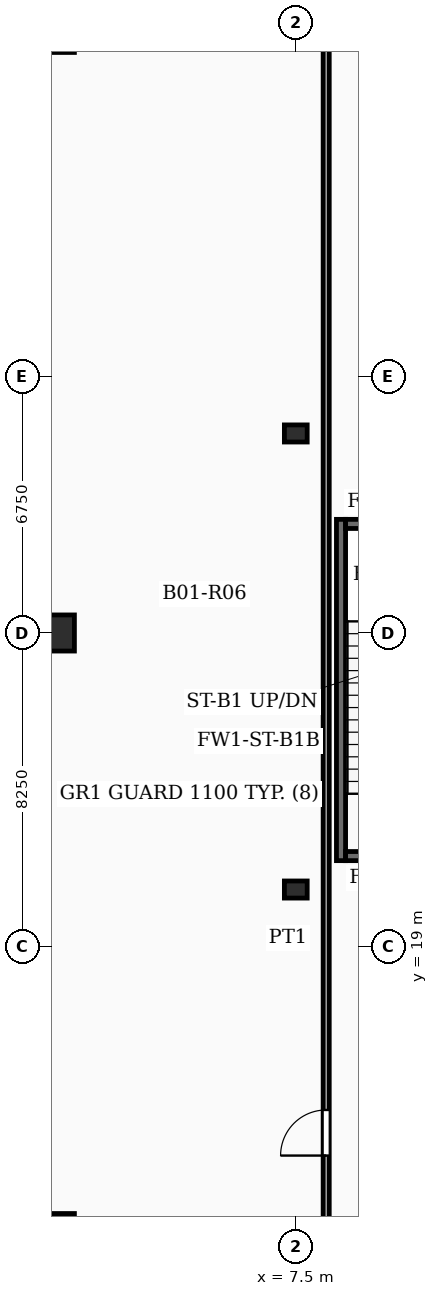
"""IFC4 building model, lengths in metres.
Left out: names, types, materials, properties, quantities, classifications, styles, units other than length and angle.
Written with IfcOpenShell. Run it as: python <this file> out.ifc"""

import sys

from ifc_helpers import new_model, si_unit, direction, frame, frame_2d, origin, origin_2d, place, context, subcontext, project, spatial, rectangle, extrude, element, fill, save


model = new_model("IFC4")
c1 = context("Model", 3, precision=1e-05, world=origin(), true_north=direction((0.0, 1.0)))
c2 = subcontext(c1, "Body", "Model", "MODEL_VIEW")
j1 = project(units=[si_unit("LENGTHUNIT", "METRE"), si_unit("PLANEANGLEUNIT", "RADIAN")], contexts=[c1])
p1 = place(None, origin())
s1 = spatial("IfcSite", under=j1, at=p1, CompositionType="ELEMENT")
p2 = place(p1, origin())
s2 = spatial("IfcBuilding", under=s1, at=p2, CompositionType="ELEMENT")
p3 = place(p2, frame((0.0, 0.0, -5.0)))
s3 = spatial("IfcBuildingStorey", under=s2, at=p3, CompositionType="ELEMENT", Elevation=-5.0)
for number, where, z_axis, x_axis in (
    (1, (1.2, 27.25, -0.31), (0.0, 0.0, 1.0), (1.0, 0.0, 0.0)),
    (2, (1.2, 11.5, -0.31), (0.0, 0.0, 1.0), (1.0, 0.0, 0.0)),
):
    element("IfcColumn", number, at=place(p3, frame(where, z_axis=z_axis, x_axis=x_axis)), inside=s3, PredefinedType="COLUMN", context=c2, shape_type="SweptSolid", body=[
        extrude(rectangle(XDim=0.95, YDim=0.95, at=origin_2d()), origin(), (0.0, 0.0, 1.0), 4.86),
    ])
for number, where, z_axis, x_axis in (
    (3, (7.5, 20.5, -0.31), (0.0, 0.0, 1.0), (1.0, 0.0, 0.0)),
    (4, (7.5, 32.5, -0.31), (0.0, 0.0, 1.0), (1.0, 0.0, 0.0)),
):
    element("IfcColumn", number, at=place(p3, frame(where, z_axis=z_axis, x_axis=x_axis)), inside=s3, PredefinedType="PILASTER", context=c2, shape_type="SweptSolid", body=[
        extrude(rectangle(XDim=0.6, YDim=0.45, at=origin_2d()), origin(), (0.0, 0.0, 1.0), 4.86),
    ])
p4 = place(p3, frame((8.69, 21.26, 0.0), z_axis=(0.0, 0.0, 1.0), x_axis=(0.0, 1.0, 0.0)))
e5 = element("IfcWall", 5, at=p4, inside=s3, PredefinedType="SOLIDWALL", context=c2, shape_type="SweptSolid", body=[
    extrude(rectangle(XDim=8.98, YDim=0.24, at=frame_2d((4.49, 0.0))), origin(), (0.0, 0.0, 1.0), 4.55),
])
for number, where, z_axis, x_axis in (
    (6, (8.81, 21.38, 0.0), (0.0, 0.0, 1.0), (1.0, 0.0, 0.0)),
    (7, (8.81, 30.12, 0.0), (0.0, 0.0, 1.0), (1.0, 0.0, 0.0)),
):
    element("IfcWall", number, at=place(p3, frame(where, z_axis=z_axis, x_axis=x_axis)), inside=s3, PredefinedType="SOLIDWALL", context=c2, shape_type="SweptSolid", body=[
        extrude(rectangle(XDim=3.19, YDim=0.24, at=frame_2d((1.595, 0.0))), origin(), (0.0, 0.0, 1.0), 4.55),
    ])
p5 = place(p3, frame((8.3, 0.5, 0.0), z_axis=(0.0, 0.0, 1.0), x_axis=(0.0, 1.0, 0.0)))
e8 = element("IfcWall", 8, at=p5, inside=s3, PredefinedType="PARTITIONING", context=c2, shape_type="SweptSolid", body=[
    extrude(rectangle(XDim=53.5, YDim=0.16, at=frame_2d((26.75, 0.0))), origin(), (0.0, 0.0, 1.0), 3.61),
])
p6 = place(p5, frame((13.0, 0.0, 0.0)))
e9 = element("IfcOpeningElement", 9, at=p6, cuts=e8, PredefinedType="OPENING", context=c2, shape_type="SweptSolid", body=[
    extrude(rectangle(XDim=1.2, YDim=2.2, at=frame_2d((0.6, 1.1))), frame((0.0, 0.09, 0.0), z_axis=(0.0, -1.0, 0.0), x_axis=(1.0, 0.0, 0.0)), (0.0, 0.0, 1.0), 0.18),
])
p7 = place(p6, origin())
e10 = element("IfcDoor", 10, at=p7, inside=s3, OperationType="SINGLE_SWING_LEFT", PredefinedType="DOOR", context=c2, shape_type="SweptSolid", body=[
    extrude(rectangle(XDim=1.2, YDim=2.2, at=frame_2d((0.6, 1.1))), frame((0.0, 0.025, 0.0), z_axis=(0.0, -1.0, 0.0), x_axis=(1.0, 0.0, 0.0)), (0.0, 0.0, 1.0), 0.05),
])
fill(e9, e10)
save(model, sys.argv[1])
